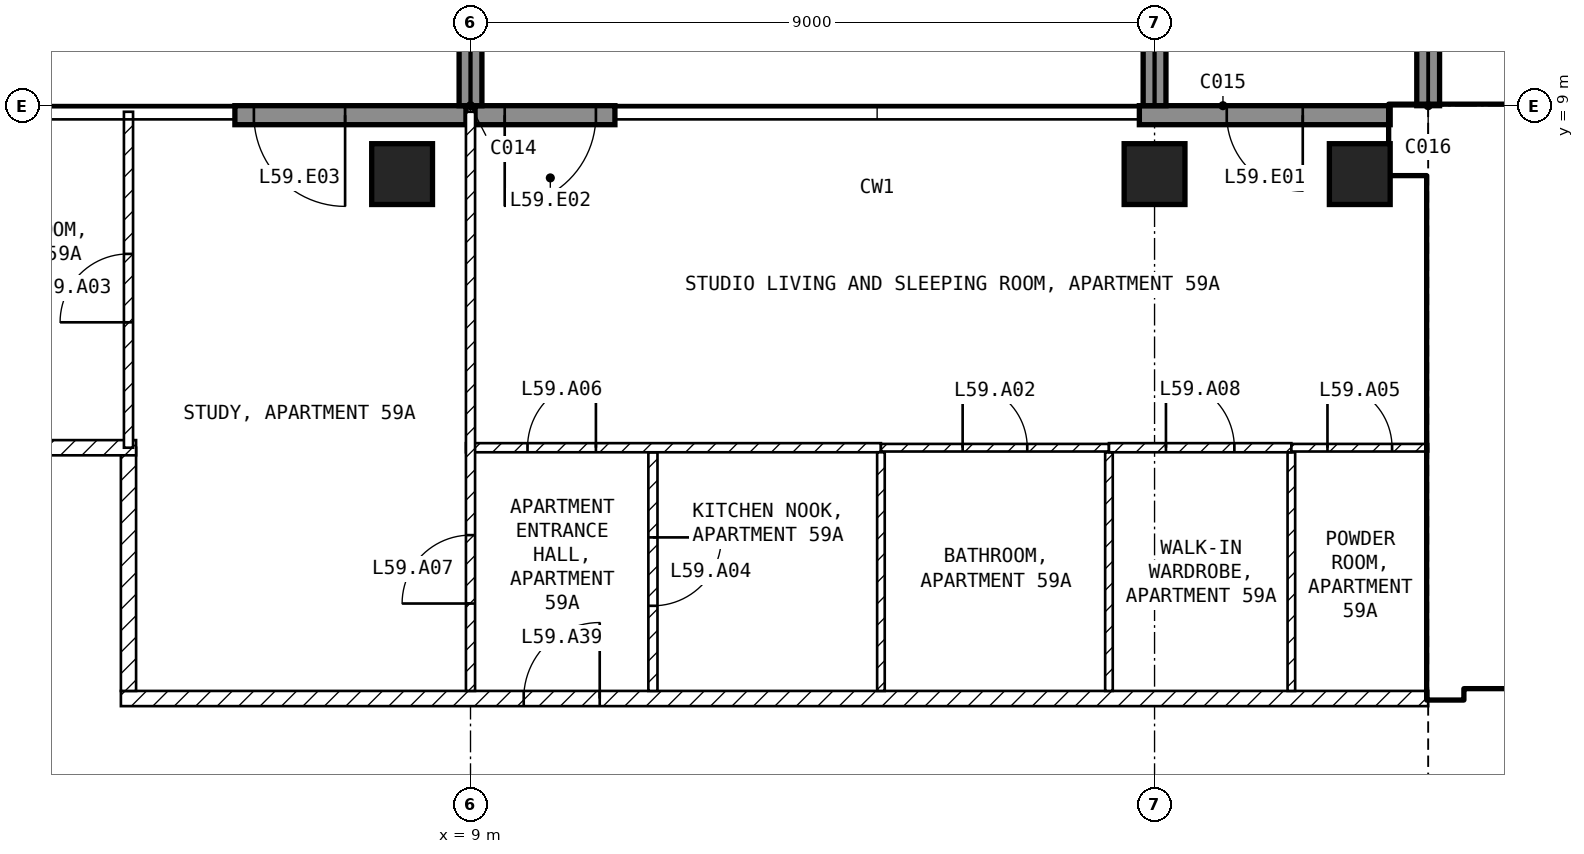
"""IFC4 building model, lengths in metres.
Left out: names, types, materials, properties, quantities, classifications, styles, units other than length and angle.
Written with IfcOpenShell. Run it as: python <this file> out.ifc"""

import sys

from ifc_helpers import new_model, si_unit, direction, frame, frame_2d, origin, origin_2d, place, context, subcontext, project, spatial, rectangle, extrude, element, fill, save


model = new_model("IFC4")
c1 = context("Model", 3, precision=1e-05, world=origin(), true_north=direction((0.0, 1.0)))
c2 = subcontext(c1, "Body", "Model", "MODEL_VIEW")
j1 = project(units=[si_unit("LENGTHUNIT", "METRE"), si_unit("PLANEANGLEUNIT", "RADIAN")], contexts=[c1])
p1 = place(None, origin())
s1 = spatial("IfcSite", under=j1, at=p1, CompositionType="ELEMENT")
p2 = place(p1, origin())
s2 = spatial("IfcBuilding", under=s1, at=p2, CompositionType="ELEMENT")
p3 = place(p2, frame((0.0, 0.0, 236.0)))
s3 = spatial("IfcBuildingStorey", under=s2, at=p3, CompositionType="ELEMENT", Elevation=236.0)
for number, where, z_axis, x_axis in (
    (1, (8.1, 8.1, -0.25), (0.0, 0.0, 1.0), (1.0, 0.0, 0.0)),
    (2, (18.0, 8.1, -0.25), (0.0, 0.0, 1.0), (1.0, 0.0, 0.0)),
    (3, (20.7, 8.1, -0.25), (0.0, 0.0, 1.0), (1.0, 0.0, 0.0)),
):
    element("IfcColumn", number, at=place(p3, frame(where, z_axis=z_axis, x_axis=x_axis)), inside=s3, PredefinedType="COLUMN", context=c2, shape_type="SweptSolid", body=[
        extrude(rectangle(XDim=0.8, YDim=0.8, at=origin_2d()), origin(), (0.0, 0.0, 1.0), 3.5),
    ])
p4 = place(p3, frame((21.1, 8.875, 0.0), z_axis=(0.0, 0.0, 1.0), x_axis=(-1.0, 0.0, 0.0)))
e4 = element("IfcWall", 4, at=p4, inside=s3, PredefinedType="SOLIDWALL", context=c2, shape_type="SweptSolid", body=[
    extrude(rectangle(XDim=3.3, YDim=0.25, at=frame_2d((1.65, 0.0))), origin(), (0.0, 0.0, 1.0), 3.25),
])
p5 = place(p4, frame((1.15, 0.0, 0.0)))
e5 = element("IfcOpeningElement", 5, at=p5, cuts=e4, PredefinedType="OPENING", context=c2, shape_type="SweptSolid", body=[
    extrude(rectangle(XDim=1.0, YDim=2.4, at=frame_2d((0.5, 1.2))), frame((0.0, 0.135, 0.0), z_axis=(0.0, -1.0, 0.0), x_axis=(1.0, 0.0, 0.0)), (0.0, 0.0, 1.0), 0.27),
])
p6 = place(p3, frame((10.9, 8.875, 0.0), z_axis=(0.0, 0.0, 1.0), x_axis=(-1.0, 0.0, 0.0)))
e6 = element("IfcWall", 6, at=p6, inside=s3, PredefinedType="SOLIDWALL", context=c2, shape_type="SweptSolid", body=[
    extrude(rectangle(XDim=1.84, YDim=0.25, at=frame_2d((0.92, 0.0))), origin(), (0.0, 0.0, 1.0), 3.25),
])
p7 = place(p6, frame((0.25, 0.0, 0.0)))
e7 = element("IfcOpeningElement", 7, at=p7, cuts=e6, PredefinedType="OPENING", context=c2, shape_type="SweptSolid", body=[
    extrude(rectangle(XDim=1.2, YDim=2.4, at=frame_2d((0.6, 1.2))), frame((0.0, 0.135, 0.0), z_axis=(0.0, -1.0, 0.0), x_axis=(1.0, 0.0, 0.0)), (0.0, 0.0, 1.0), 0.27),
])
p8 = place(p3, frame((8.94, 8.875, 0.0), z_axis=(0.0, 0.0, 1.0), x_axis=(-1.0, 0.0, 0.0)))
e8 = element("IfcWall", 8, at=p8, inside=s3, PredefinedType="SOLIDWALL", context=c2, shape_type="SweptSolid", body=[
    extrude(rectangle(XDim=3.04, YDim=0.25, at=frame_2d((1.52, 0.0))), origin(), (0.0, 0.0, 1.0), 3.25),
])
p9 = place(p8, frame((1.59, 0.0, 0.0)))
e9 = element("IfcOpeningElement", 9, at=p9, cuts=e8, PredefinedType="OPENING", context=c2, shape_type="SweptSolid", body=[
    extrude(rectangle(XDim=1.2, YDim=2.4, at=frame_2d((0.6, 1.2))), frame((0.0, 0.135, 0.0), z_axis=(0.0, -1.0, 0.0), x_axis=(1.0, 0.0, 0.0)), (0.0, 0.0, 1.0), 0.27),
])
for number, where, z_axis, x_axis in (
    (10, (9.0, 9.0, 0.0), (0.0, 0.0, 1.0), (0.0, 1.0, 0.0)),
    (11, (18.0, 9.0, 0.0), (0.0, 0.0, 1.0), (0.0, 1.0, 0.0)),
    (12, (21.6, 9.0, 0.0), (0.0, 0.0, 1.0), (0.0, 1.0, 0.0)),
):
    element("IfcWall", number, at=place(p3, frame(where, z_axis=z_axis, x_axis=x_axis)), inside=s3, PredefinedType="SOLIDWALL", context=c2, shape_type="SweptSolid", body=[
        extrude(rectangle(XDim=2.7, YDim=0.3, at=frame_2d((1.35, 0.0))), origin(), (0.0, 0.0, 1.0), 3.25),
    ])
p10 = place(p3, frame((21.1, 8.55, 0.0), z_axis=(0.0, 0.0, 1.0), x_axis=(1.0, 0.0, 0.0)))
e13 = element("IfcWall", 13, at=p10, inside=s3, PredefinedType="SHEAR", context=c2, shape_type="SweptSolid", body=[
    extrude(rectangle(XDim=8.65, YDim=0.9, at=frame_2d((4.325, 0.0))), origin(), (0.0, 0.0, 1.0), 3.25),
])
p11 = place(p3, frame((21.825, 1.2, 0.0), z_axis=(0.0, 0.0, 1.0), x_axis=(0.0, 1.0, 0.0)))
e14 = element("IfcWall", 14, at=p11, inside=s3, PredefinedType="SHEAR", context=c2, shape_type="SweptSolid", body=[
    extrude(rectangle(XDim=6.9, YDim=0.45, at=frame_2d((3.45, 0.0))), origin(), (0.0, 0.0, 1.0), 3.25),
])
p12 = place(p3, frame((22.05, 1.45, 0.0), z_axis=(0.0, 0.0, 1.0), x_axis=(1.0, 0.0, 0.0)))
e15 = element("IfcWall", 15, at=p12, inside=s3, PredefinedType="SOLIDWALL", context=c2, shape_type="SweptSolid", body=[
    extrude(rectangle(XDim=11.3, YDim=0.2, at=frame_2d((5.65, 0.0))), origin(), (0.0, 0.0, 1.0), 3.25),
])
p13 = place(p12, frame((0.75, 0.0, 0.0)))
e16 = element("IfcOpeningElement", 16, at=p13, cuts=e15, PredefinedType="OPENING", context=c2, shape_type="SweptSolid", body=[
    extrude(rectangle(XDim=1.0, YDim=2.1, at=frame_2d((0.5, 1.05))), frame((0.0, 0.11, 0.0), z_axis=(0.0, -1.0, 0.0), x_axis=(1.0, 0.0, 0.0)), (0.0, 0.0, 1.0), 0.22),
])
p14 = place(p12, frame((3.25, 0.0, 0.0)))
e17 = element("IfcOpeningElement", 17, at=p14, cuts=e15, PredefinedType="OPENING", context=c2, shape_type="SweptSolid", body=[
    extrude(rectangle(XDim=1.0, YDim=2.1, at=frame_2d((0.5, 1.05))), frame((0.0, 0.11, 0.0), z_axis=(0.0, -1.0, 0.0), x_axis=(1.0, 0.0, 0.0)), (0.0, 0.0, 1.0), 0.22),
])
p15 = place(p12, frame((9.225, 0.0, 0.0)))
e18 = element("IfcOpeningElement", 18, at=p15, cuts=e15, PredefinedType="OPENING", context=c2, shape_type="SweptSolid", body=[
    extrude(rectangle(XDim=0.9, YDim=2.1, at=frame_2d((0.45, 1.05))), frame((0.0, 0.11, 0.0), z_axis=(0.0, -1.0, 0.0), x_axis=(1.0, 0.0, 0.0)), (0.0, 0.0, 1.0), 0.22),
])
p16 = place(p3, frame((22.05, 5.15, 0.0), z_axis=(0.0, 0.0, 1.0), x_axis=(1.0, 0.0, 0.0)))
e19 = element("IfcWall", 19, at=p16, inside=s3, PredefinedType="SOLIDWALL", context=c2, shape_type="SweptSolid", body=[
    extrude(rectangle(XDim=6.3, YDim=0.2, at=frame_2d((3.15, 0.0))), origin(), (0.0, 0.0, 1.0), 3.25),
])
p17 = place(p16, frame((0.2, 0.0, 0.0)))
e20 = element("IfcOpeningElement", 20, at=p17, cuts=e19, PredefinedType="OPENING", context=c2, shape_type="SweptSolid", body=[
    extrude(rectangle(XDim=1.0, YDim=2.1, at=frame_2d((0.5, 1.05))), frame((0.0, 0.11, 0.0), z_axis=(0.0, -1.0, 0.0), x_axis=(1.0, 0.0, 0.0)), (0.0, 0.0, 1.0), 0.22),
])
p18 = place(p3, frame((4.4, 1.2, 0.0), z_axis=(0.0, 0.0, 1.0), x_axis=(1.0, 0.0, 0.0)))
e21 = element("IfcWall", 21, at=p18, inside=s3, PredefinedType="PARTITIONING", context=c2, shape_type="SweptSolid", body=[
    extrude(rectangle(XDim=17.2, YDim=0.2, at=frame_2d((8.6, 0.0))), origin(), (0.0, 0.0, 1.0), 3.25),
])
p19 = place(p18, frame((5.3, 0.0, 0.0)))
e22 = element("IfcOpeningElement", 22, at=p19, cuts=e21, PredefinedType="OPENING", context=c2, shape_type="SweptSolid", body=[
    extrude(rectangle(XDim=1.0, YDim=2.1, at=frame_2d((0.5, 1.05))), frame((0.0, 0.11, 0.0), z_axis=(0.0, -1.0, 0.0), x_axis=(1.0, 0.0, 0.0)), (0.0, 0.0, 1.0), 0.22),
])
p20 = place(p3, frame((4.5, 4.5, 0.0), z_axis=(0.0, 0.0, 1.0), x_axis=(0.0, -1.0, 0.0)))
e23 = element("IfcWall", 23, at=p20, inside=s3, PredefinedType="PARTITIONING", context=c2, shape_type="SweptSolid", body=[
    extrude(rectangle(XDim=3.2, YDim=0.2, at=frame_2d((1.6, 0.0))), origin(), (0.0, 0.0, 1.0), 3.25),
])
p21 = place(p3, frame((1.1, 4.5, 0.0), z_axis=(0.0, 0.0, 1.0), x_axis=(1.0, 0.0, 0.0)))
e24 = element("IfcWall", 24, at=p21, inside=s3, PredefinedType="PARTITIONING", context=c2, shape_type="SweptSolid", body=[
    extrude(rectangle(XDim=3.5, YDim=0.2, at=frame_2d((1.75, 0.0))), origin(), (0.0, 0.0, 1.0), 3.25),
])
p22 = place(p3, frame((11.4, 4.44, 0.0), z_axis=(0.0, 0.0, 1.0), x_axis=(0.0, -1.0, 0.0)))
e25 = element("IfcWall", 25, at=p22, inside=s3, PredefinedType="PARTITIONING", context=c2, shape_type="SweptSolid", body=[
    extrude(rectangle(XDim=3.14, YDim=0.12, at=frame_2d((1.57, 0.0))), origin(), (0.0, 0.0, 1.0), 3.25),
])
p23 = place(p22, frame((1.12, 0.0, 0.0)))
e26 = element("IfcOpeningElement", 26, at=p23, cuts=e25, PredefinedType="OPENING", context=c2, shape_type="SweptSolid", body=[
    extrude(rectangle(XDim=0.9, YDim=2.1, at=frame_2d((0.45, 1.05))), frame((0.0, 0.07, 0.0), z_axis=(0.0, -1.0, 0.0), x_axis=(1.0, 0.0, 0.0)), (0.0, 0.0, 1.0), 0.14),
])
p24 = place(p3, frame((8.94, 4.5, 0.0), z_axis=(0.0, 0.0, 1.0), x_axis=(1.0, 0.0, 0.0)))
e27 = element("IfcWall", 27, at=p24, inside=s3, PredefinedType="PARTITIONING", context=c2, shape_type="SweptSolid", body=[
    extrude(rectangle(XDim=5.46, YDim=0.12, at=frame_2d((2.73, 0.0))), origin(), (0.0, 0.0, 1.0), 3.25),
])
p25 = place(p24, frame((0.81, 0.0, 0.0)))
e28 = element("IfcOpeningElement", 28, at=p25, cuts=e27, PredefinedType="OPENING", context=c2, shape_type="SweptSolid", body=[
    extrude(rectangle(XDim=0.9, YDim=2.1, at=frame_2d((0.45, 1.05))), frame((0.0, 0.07, 0.0), z_axis=(0.0, -1.0, 0.0), x_axis=(1.0, 0.0, 0.0)), (0.0, 0.0, 1.0), 0.14),
])
p26 = place(p3, frame((9.0, 1.3, 0.0), z_axis=(0.0, 0.0, 1.0), x_axis=(0.0, 1.0, 0.0)))
e29 = element("IfcWall", 29, at=p26, inside=s3, PredefinedType="PARTITIONING", context=c2, shape_type="SweptSolid", body=[
    extrude(rectangle(XDim=7.62, YDim=0.12, at=frame_2d((3.81, 0.0))), origin(), (0.0, 0.0, 1.0), 3.25),
])
p27 = place(p26, frame((1.15, 0.0, 0.0)))
e30 = element("IfcOpeningElement", 30, at=p27, cuts=e29, PredefinedType="OPENING", context=c2, shape_type="SweptSolid", body=[
    extrude(rectangle(XDim=0.9, YDim=2.1, at=frame_2d((0.45, 1.05))), frame((0.0, 0.07, 0.0), z_axis=(0.0, -1.0, 0.0), x_axis=(1.0, 0.0, 0.0)), (0.0, 0.0, 1.0), 0.14),
])
for number, where, z_axis, x_axis in (
    (31, (14.4, 4.44, 0.0), (0.0, 0.0, 1.0), (0.0, -1.0, 0.0)),
    (32, (17.4, 4.44, 0.0), (0.0, 0.0, 1.0), (0.0, -1.0, 0.0)),
):
    element("IfcWall", number, at=place(p3, frame(where, z_axis=z_axis, x_axis=x_axis)), inside=s3, PredefinedType="PARTITIONING", context=c2, shape_type="SweptSolid", body=[
        extrude(rectangle(XDim=3.14, YDim=0.1, at=frame_2d((1.57, 0.0))), origin(), (0.0, 0.0, 1.0), 3.25),
    ])
p28 = place(p3, frame((14.4, 4.5, 0.0), z_axis=(0.0, 0.0, 1.0), x_axis=(1.0, 0.0, 0.0)))
e33 = element("IfcWall", 33, at=p28, inside=s3, PredefinedType="PARTITIONING", context=c2, shape_type="SweptSolid", body=[
    extrude(rectangle(XDim=3.0, YDim=0.1, at=frame_2d((1.5, 0.0))), origin(), (0.0, 0.0, 1.0), 3.25),
])
p29 = place(p28, frame((1.075, 0.0, 0.0)))
e34 = element("IfcOpeningElement", 34, at=p29, cuts=e33, PredefinedType="OPENING", context=c2, shape_type="SweptSolid", body=[
    extrude(rectangle(XDim=0.85, YDim=2.1, at=frame_2d((0.425, 1.05))), frame((0.0, 0.06, 0.0), z_axis=(0.0, -1.0, 0.0), x_axis=(1.0, 0.0, 0.0)), (0.0, 0.0, 1.0), 0.12),
])
p30 = place(p3, frame((19.8, 4.44, 0.0), z_axis=(0.0, 0.0, 1.0), x_axis=(0.0, -1.0, 0.0)))
e35 = element("IfcWall", 35, at=p30, inside=s3, PredefinedType="PARTITIONING", context=c2, shape_type="SweptSolid", body=[
    extrude(rectangle(XDim=3.14, YDim=0.1, at=frame_2d((1.57, 0.0))), origin(), (0.0, 0.0, 1.0), 3.25),
])
p31 = place(p3, frame((17.4, 4.5, 0.0), z_axis=(0.0, 0.0, 1.0), x_axis=(1.0, 0.0, 0.0)))
e36 = element("IfcWall", 36, at=p31, inside=s3, PredefinedType="PARTITIONING", context=c2, shape_type="SweptSolid", body=[
    extrude(rectangle(XDim=2.4, YDim=0.12, at=frame_2d((1.2, 0.0))), origin(), (0.0, 0.0, 1.0), 3.25),
])
p32 = place(p31, frame((0.75, 0.0, 0.0)))
e37 = element("IfcOpeningElement", 37, at=p32, cuts=e36, PredefinedType="OPENING", context=c2, shape_type="SweptSolid", body=[
    extrude(rectangle(XDim=0.9, YDim=2.1, at=frame_2d((0.45, 1.05))), frame((0.0, 0.07, 0.0), z_axis=(0.0, -1.0, 0.0), x_axis=(1.0, 0.0, 0.0)), (0.0, 0.0, 1.0), 0.14),
])
p33 = place(p3, frame((19.8, 4.5, 0.0), z_axis=(0.0, 0.0, 1.0), x_axis=(1.0, 0.0, 0.0)))
e38 = element("IfcWall", 38, at=p33, inside=s3, PredefinedType="PARTITIONING", context=c2, shape_type="SweptSolid", body=[
    extrude(rectangle(XDim=1.8, YDim=0.1, at=frame_2d((0.9, 0.0))), origin(), (0.0, 0.0, 1.0), 3.25),
])
p34 = place(p33, frame((0.475, 0.0, 0.0)))
e39 = element("IfcOpeningElement", 39, at=p34, cuts=e38, PredefinedType="OPENING", context=c2, shape_type="SweptSolid", body=[
    extrude(rectangle(XDim=0.85, YDim=2.1, at=frame_2d((0.425, 1.05))), frame((0.0, 0.06, 0.0), z_axis=(0.0, -1.0, 0.0), x_axis=(1.0, 0.0, 0.0)), (0.0, 0.0, 1.0), 0.12),
])
p35 = place(p3, frame((4.5, 4.5, 0.0), z_axis=(0.0, 0.0, 1.0), x_axis=(0.0, 1.0, 0.0)))
e40 = element("IfcWall", 40, at=p35, inside=s3, PredefinedType="PARTITIONING", context=c2, shape_type="SweptSolid", body=[
    extrude(rectangle(XDim=4.42, YDim=0.12, at=frame_2d((2.21, 0.0))), origin(), (0.0, 0.0, 1.0), 3.25),
])
p36 = place(p35, frame((1.65, 0.0, 0.0)))
e41 = element("IfcOpeningElement", 41, at=p36, cuts=e40, PredefinedType="OPENING", context=c2, shape_type="SweptSolid", body=[
    extrude(rectangle(XDim=0.9, YDim=2.1, at=frame_2d((0.45, 1.05))), frame((0.0, 0.07, 0.0), z_axis=(0.0, -1.0, 0.0), x_axis=(1.0, 0.0, 0.0)), (0.0, 0.0, 1.0), 0.14),
])
p37 = place(p5, origin())
e42 = element("IfcDoor", 42, at=p37, inside=s3, OperationType="SINGLE_SWING_LEFT", PredefinedType="DOOR", context=c2, shape_type="SweptSolid", body=[
    extrude(rectangle(XDim=1.0, YDim=2.4, at=frame_2d((0.5, 1.2))), frame((0.0, 0.025, 0.0), z_axis=(0.0, -1.0, 0.0), x_axis=(1.0, 0.0, 0.0)), (0.0, 0.0, 1.0), 0.05),
])
fill(e5, e42)
p38 = place(p7, origin())
e43 = element("IfcDoor", 43, at=p38, inside=s3, OperationType="SINGLE_SWING_RIGHT", PredefinedType="DOOR", context=c2, shape_type="SweptSolid", body=[
    extrude(rectangle(XDim=1.2, YDim=2.4, at=frame_2d((0.6, 1.2))), frame((0.0, 0.025, 0.0), z_axis=(0.0, -1.0, 0.0), x_axis=(1.0, 0.0, 0.0)), (0.0, 0.0, 1.0), 0.05),
])
fill(e7, e43)
p39 = place(p9, origin())
e44 = element("IfcDoor", 44, at=p39, inside=s3, OperationType="SINGLE_SWING_LEFT", PredefinedType="DOOR", context=c2, shape_type="SweptSolid", body=[
    extrude(rectangle(XDim=1.2, YDim=2.4, at=frame_2d((0.6, 1.2))), frame((0.0, 0.025, 0.0), z_axis=(0.0, -1.0, 0.0), x_axis=(1.0, 0.0, 0.0)), (0.0, 0.0, 1.0), 0.05),
])
fill(e9, e44)
p40 = place(p17, origin())
e45 = element("IfcDoor", 45, at=p40, inside=s3, OperationType="SINGLE_SWING_LEFT", PredefinedType="DOOR", context=c2, shape_type="SweptSolid", body=[
    extrude(rectangle(XDim=1.0, YDim=2.1, at=frame_2d((0.5, 1.05))), frame((0.0, 0.025, 0.0), z_axis=(0.0, -1.0, 0.0), x_axis=(1.0, 0.0, 0.0)), (0.0, 0.0, 1.0), 0.05),
])
fill(e20, e45)
p41 = place(p29, origin())
e46 = element("IfcDoor", 46, at=p41, inside=s3, OperationType="SINGLE_SWING_LEFT", PredefinedType="DOOR", context=c2, shape_type="SweptSolid", body=[
    extrude(rectangle(XDim=0.85, YDim=2.1, at=frame_2d((0.425, 1.05))), frame((0.0, 0.025, 0.0), z_axis=(0.0, -1.0, 0.0), x_axis=(1.0, 0.0, 0.0)), (0.0, 0.0, 1.0), 0.05),
])
fill(e34, e46)
p42 = place(p36, origin())
e47 = element("IfcDoor", 47, at=p42, inside=s3, OperationType="SINGLE_SWING_LEFT", PredefinedType="DOOR", context=c2, shape_type="SweptSolid", body=[
    extrude(rectangle(XDim=0.9, YDim=2.1, at=frame_2d((0.45, 1.05))), frame((0.0, 0.025, 0.0), z_axis=(0.0, -1.0, 0.0), x_axis=(1.0, 0.0, 0.0)), (0.0, 0.0, 1.0), 0.05),
])
fill(e41, e47)
p43 = place(p23, origin())
e48 = element("IfcDoor", 48, at=p43, inside=s3, OperationType="SINGLE_SWING_LEFT", PredefinedType="DOOR", context=c2, shape_type="SweptSolid", body=[
    extrude(rectangle(XDim=0.9, YDim=2.1, at=frame_2d((0.45, 1.05))), frame((0.0, 0.025, 0.0), z_axis=(0.0, -1.0, 0.0), x_axis=(1.0, 0.0, 0.0)), (0.0, 0.0, 1.0), 0.05),
])
fill(e26, e48)
p44 = place(p34, origin())
e49 = element("IfcDoor", 49, at=p44, inside=s3, OperationType="SINGLE_SWING_LEFT", PredefinedType="DOOR", context=c2, shape_type="SweptSolid", body=[
    extrude(rectangle(XDim=0.85, YDim=2.1, at=frame_2d((0.425, 1.05))), frame((0.0, 0.025, 0.0), z_axis=(0.0, -1.0, 0.0), x_axis=(1.0, 0.0, 0.0)), (0.0, 0.0, 1.0), 0.05),
])
fill(e39, e49)
p45 = place(p25, origin())
e50 = element("IfcDoor", 50, at=p45, inside=s3, OperationType="SINGLE_SWING_RIGHT", PredefinedType="DOOR", context=c2, shape_type="SweptSolid", body=[
    extrude(rectangle(XDim=0.9, YDim=2.1, at=frame_2d((0.45, 1.05))), frame((0.0, 0.025, 0.0), z_axis=(0.0, -1.0, 0.0), x_axis=(1.0, 0.0, 0.0)), (0.0, 0.0, 1.0), 0.05),
])
fill(e28, e50)
p46 = place(p27, origin())
e51 = element("IfcDoor", 51, at=p46, inside=s3, OperationType="SINGLE_SWING_LEFT", PredefinedType="DOOR", context=c2, shape_type="SweptSolid", body=[
    extrude(rectangle(XDim=0.9, YDim=2.1, at=frame_2d((0.45, 1.05))), frame((0.0, 0.025, 0.0), z_axis=(0.0, -1.0, 0.0), x_axis=(1.0, 0.0, 0.0)), (0.0, 0.0, 1.0), 0.05),
])
fill(e30, e51)
p47 = place(p32, origin())
e52 = element("IfcDoor", 52, at=p47, inside=s3, OperationType="SINGLE_SWING_LEFT", PredefinedType="DOOR", context=c2, shape_type="SweptSolid", body=[
    extrude(rectangle(XDim=0.9, YDim=2.1, at=frame_2d((0.45, 1.05))), frame((0.0, 0.025, 0.0), z_axis=(0.0, -1.0, 0.0), x_axis=(1.0, 0.0, 0.0)), (0.0, 0.0, 1.0), 0.05),
])
fill(e37, e52)
p48 = place(p19, origin())
e53 = element("IfcDoor", 53, at=p48, inside=s3, OperationType="SINGLE_SWING_RIGHT", PredefinedType="DOOR", context=c2, shape_type="SweptSolid", body=[
    extrude(rectangle(XDim=1.0, YDim=2.1, at=frame_2d((0.5, 1.05))), frame((0.0, 0.025, 0.0), z_axis=(0.0, -1.0, 0.0), x_axis=(1.0, 0.0, 0.0)), (0.0, 0.0, 1.0), 0.05),
])
fill(e22, e53)
save(model, sys.argv[1])
